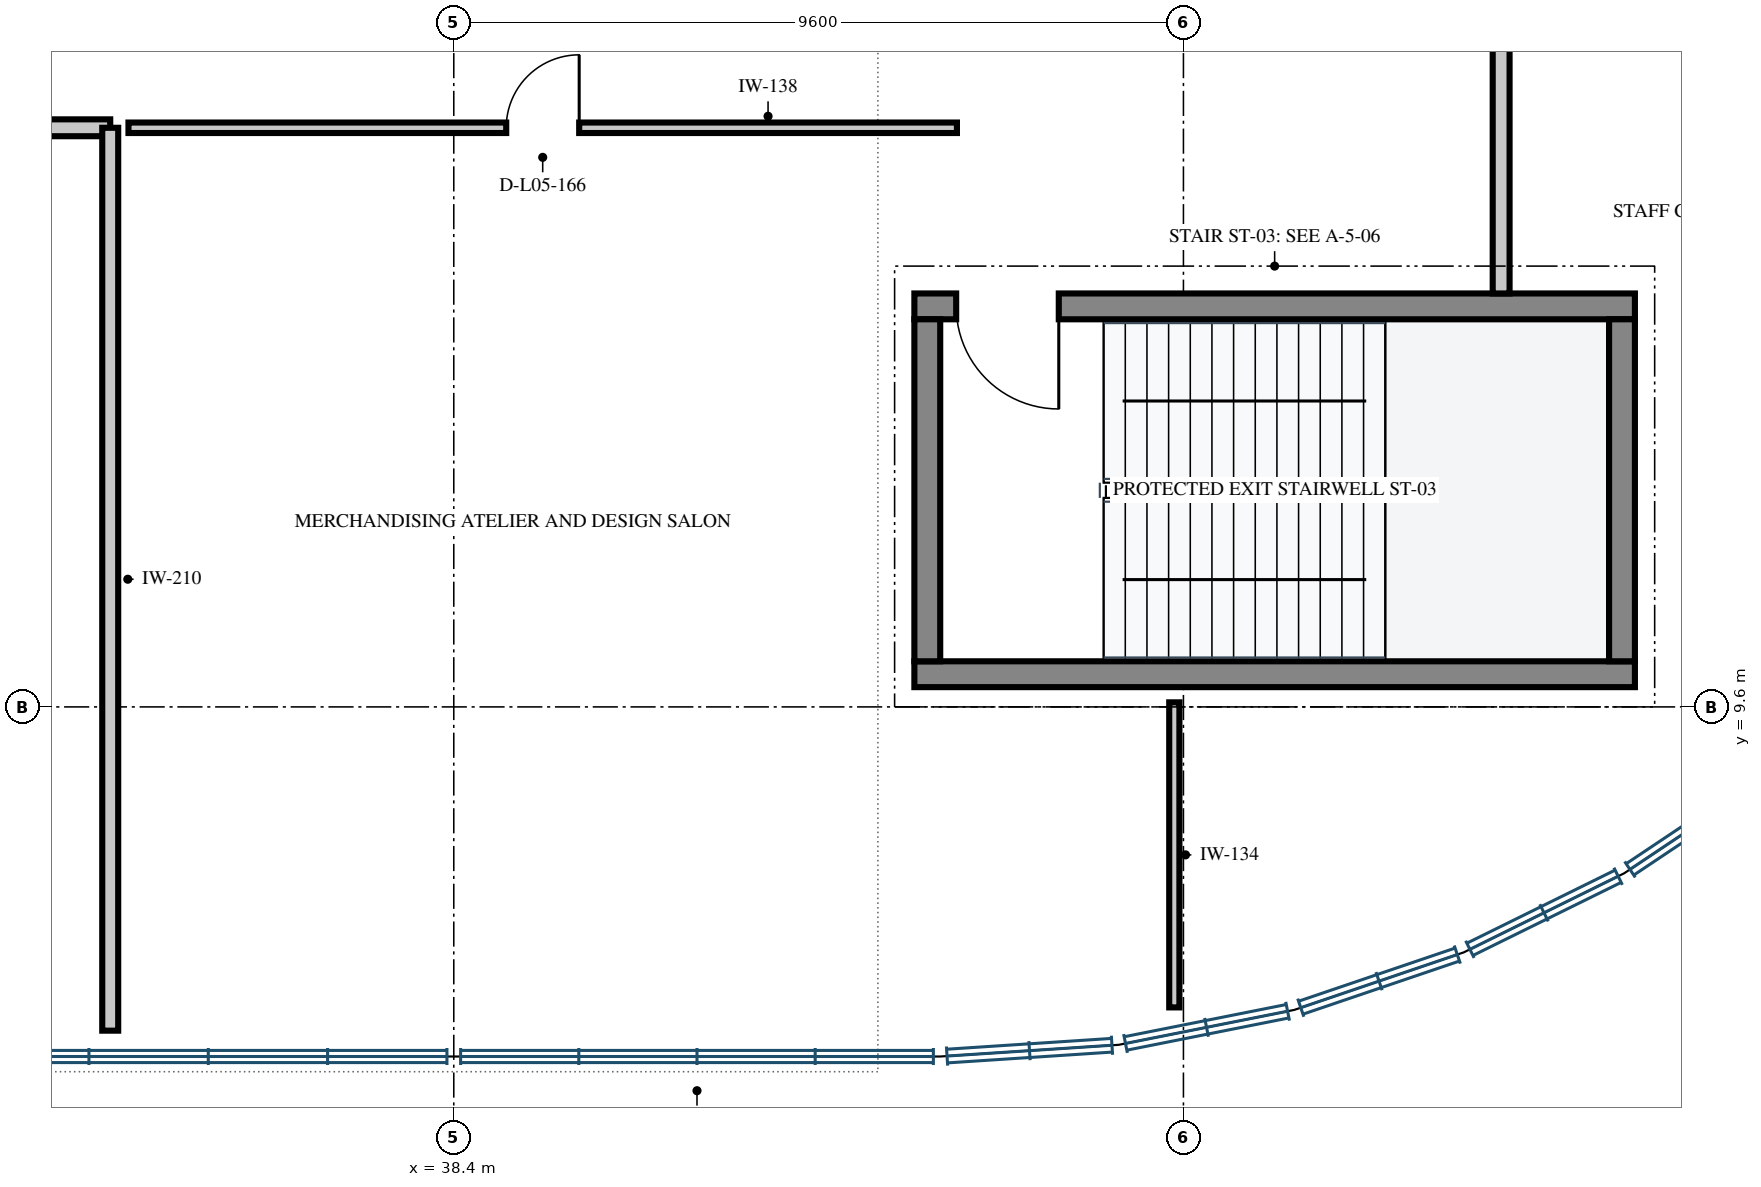
"""IFC4 building model, lengths in metres.
Left out: names, types, materials, properties, quantities, classifications, styles, units other than length and angle.
Written with IfcOpenShell. Run it as: python <this file> out.ifc"""

import sys

from ifc_helpers import new_model, si_unit, direction, frame, frame_2d, origin, place, context, subcontext, project, spatial, rectangle, extrude, element, fill, save


model = new_model("IFC4")
c1 = context("Model", 3, precision=1e-05, world=origin(), true_north=direction((0.0, 1.0)))
c2 = subcontext(c1, "Body", "Model", "MODEL_VIEW")
j1 = project(units=[si_unit("LENGTHUNIT", "METRE"), si_unit("PLANEANGLEUNIT", "RADIAN")], contexts=[c1])
p1 = place(None, origin())
s1 = spatial("IfcSite", under=j1, at=p1, CompositionType="ELEMENT")
p2 = place(p1, origin())
s2 = spatial("IfcBuilding", under=s1, at=p2, CompositionType="ELEMENT")
p3 = place(p2, frame((0.0, 0.0, 24.6)))
s3 = spatial("IfcBuildingStorey", under=s2, at=p3, CompositionType="ELEMENT", Elevation=24.6)
p4 = place(p3, frame((44.46, 10.03, 0.0), z_axis=(0.0, 0.0, 1.0), x_axis=(1.0, 0.0, 0.0)))
e1 = element("IfcWall", 1, at=p4, inside=s3, PredefinedType="SHEAR", context=c2, shape_type="SweptSolid", body=[
    extrude(rectangle(XDim=9.48, YDim=0.34, at=frame_2d((4.74, 0.0))), origin(), (0.0, 0.0, 1.0), 4.51),
])
p5 = place(p3, frame((44.46, 14.87, 0.0), z_axis=(0.0, 0.0, 1.0), x_axis=(1.0, 0.0, 0.0)))
e2 = element("IfcWall", 2, at=p5, inside=s3, PredefinedType="SHEAR", context=c2, shape_type="SweptSolid", body=[
    extrude(rectangle(XDim=9.48, YDim=0.34, at=frame_2d((4.74, 0.0))), origin(), (0.0, 0.0, 1.0), 4.51),
])
p6 = place(p5, frame((0.55, 0.0, 0.0)))
e3 = element("IfcOpeningElement", 3, at=p6, cuts=e2, PredefinedType="OPENING", context=c2, shape_type="SweptSolid", body=[
    extrude(rectangle(XDim=1.35, YDim=2.2, at=frame_2d((0.675, 1.1))), frame((0.0, 0.182, 0.0), z_axis=(0.0, -1.0, 0.0), x_axis=(1.0, 0.0, 0.0)), (0.0, 0.0, 1.0), 0.364),
])
for number, where, z_axis, x_axis in (
    (4, (53.77, 10.2, 0.0), (0.0, 0.0, 1.0), (0.0, 1.0, 0.0)),
    (5, (44.63, 10.2, 0.0), (0.0, 0.0, 1.0), (0.0, 1.0, 0.0)),
):
    element("IfcWall", number, at=place(p3, frame(where, z_axis=z_axis, x_axis=x_axis)), inside=s3, PredefinedType="SHEAR", context=c2, shape_type="SweptSolid", body=[
        extrude(rectangle(XDim=4.5, YDim=0.34, at=frame_2d((2.25, 0.0))), origin(), (0.0, 0.0, 1.0), 4.51),
    ])
p7 = place(p3, frame((21.98, 17.22, 0.0), z_axis=(0.0, 0.0, 1.0), x_axis=(1.0, 0.0, 0.0)))
e6 = element("IfcWall", 6, at=p7, inside=s3, PredefinedType="PARTITIONING", context=c2, shape_type="SweptSolid", body=[
    extrude(rectangle(XDim=11.9, YDim=0.222, at=frame_2d((5.95, 0.0))), origin(), (0.0, 0.0, 1.0), 4.51),
])
p8 = place(p3, frame((33.88, 17.22, 0.0), z_axis=(0.0, 0.0, 1.0), x_axis=(0.0, -1.0, 0.0)))
e7 = element("IfcWall", 7, at=p8, inside=s3, PredefinedType="PARTITIONING", context=c2, shape_type="SweptSolid", body=[
    extrude(rectangle(XDim=11.88, YDim=0.21, at=frame_2d((5.94, 0.0))), origin(), (0.0, 0.0, 1.0), 4.51),
])
p9 = place(p3, frame((34.12, 17.22, 0.0), z_axis=(0.0, 0.0, 1.0), x_axis=(1.0, 0.0, 0.0)))
e8 = element("IfcWall", 8, at=p9, inside=s3, PredefinedType="PARTITIONING", context=c2, shape_type="SweptSolid", body=[
    extrude(rectangle(XDim=10.9, YDim=0.138, at=frame_2d((5.45, 0.0))), origin(), (0.0, 0.0, 1.0), 4.51),
])
p10 = place(p9, frame((4.97, 0.0, 0.0)))
e9 = element("IfcOpeningElement", 9, at=p10, cuts=e8, PredefinedType="OPENING", context=c2, shape_type="SweptSolid", body=[
    extrude(rectangle(XDim=0.96, YDim=2.13, at=frame_2d((0.48, 1.065))), frame((0.0, 0.081, 0.0), z_axis=(0.0, -1.0, 0.0), x_axis=(1.0, 0.0, 0.0)), (0.0, 0.0, 1.0), 0.162),
])
p11 = place(p3, frame((47.88, 9.66, 0.0), z_axis=(0.0, 0.0, 1.0), x_axis=(0.0, -1.0, 0.0)))
e10 = element("IfcWall", 10, at=p11, inside=s3, PredefinedType="PARTITIONING", context=c2, shape_type="SweptSolid", body=[
    extrude(rectangle(XDim=4.014, YDim=0.134, at=frame_2d((2.007, 0.0))), origin(), (0.0, 0.0, 1.0), 4.51),
])
p12 = place(p3, frame((52.18, 15.04, 0.0), z_axis=(0.0, 0.0, 1.0), x_axis=(0.0, 1.0, 0.0)))
e11 = element("IfcWall", 11, at=p12, inside=s3, PredefinedType="PARTITIONING", context=c2, shape_type="SweptSolid", body=[
    extrude(rectangle(XDim=5.52, YDim=0.222, at=frame_2d((2.76, 0.0))), origin(), (0.0, 0.0, 1.0), 2.9),
])
p13 = place(p6, frame((1.35, 0.0, 0.0), z_axis=(0.0, 0.0, 1.0), x_axis=(-1.0, 0.0, 0.0)))
e12 = element("IfcDoor", 12, at=p13, inside=s3, OperationType="SINGLE_SWING_LEFT", PredefinedType="DOOR", context=c2, shape_type="SweptSolid", body=[
    extrude(rectangle(XDim=1.35, YDim=2.2, at=frame_2d((0.675, 1.1))), frame((0.0, 0.025, 0.0), z_axis=(0.0, -1.0, 0.0), x_axis=(1.0, 0.0, 0.0)), (0.0, 0.0, 1.0), 0.05),
])
fill(e3, e12)
p14 = place(p10, origin())
e13 = element("IfcDoor", 13, at=p14, inside=s3, OperationType="SINGLE_SWING_RIGHT", PredefinedType="DOOR", context=c2, shape_type="SweptSolid", body=[
    extrude(rectangle(XDim=0.96, YDim=2.13, at=frame_2d((0.48, 1.065))), frame((0.0, 0.025, 0.0), z_axis=(0.0, -1.0, 0.0), x_axis=(1.0, 0.0, 0.0)), (0.0, 0.0, 1.0), 0.05),
])
fill(e9, e13)
save(model, sys.argv[1])
